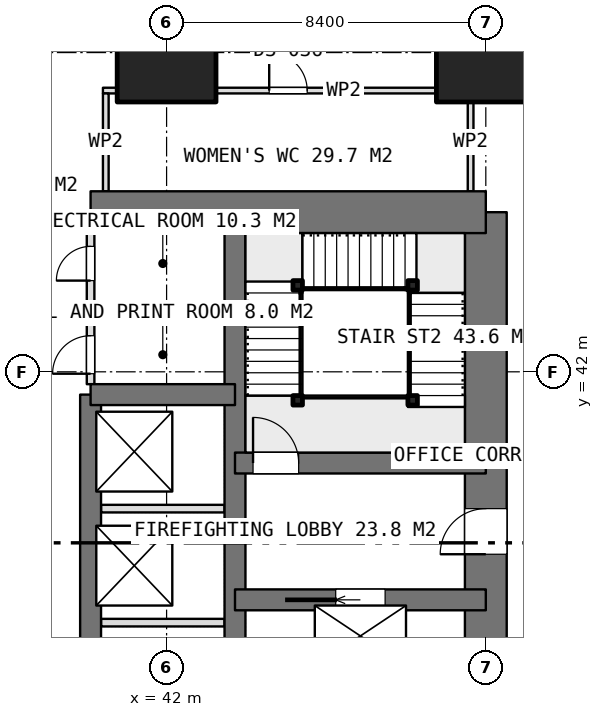
"""IFC4 building model, lengths in metres.
Left out: names, types, materials, properties, quantities, classifications, styles, units other than length and angle.
Written with IfcOpenShell. Run it as: python <this file> out.ifc"""

import sys

from ifc_helpers import new_model, si_unit, direction, frame, frame_2d, origin, origin_2d, place, context, subcontext, project, spatial, rectangle, extrude, element, fill, save


model = new_model("IFC4")
c1 = context("Model", 3, precision=1e-05, world=origin(), true_north=direction((0.0, 1.0)))
c2 = subcontext(c1, "Body", "Model", "MODEL_VIEW")
j1 = project(units=[si_unit("LENGTHUNIT", "METRE"), si_unit("PLANEANGLEUNIT", "RADIAN")], contexts=[c1])
p1 = place(None, origin())
s1 = spatial("IfcSite", under=j1, at=p1, CompositionType="ELEMENT")
p2 = place(p1, origin())
s2 = spatial("IfcBuilding", under=s1, at=p2, CompositionType="ELEMENT")
p3 = place(p2, frame((0.0, 0.0, 29.15)))
s3 = spatial("IfcBuildingStorey", under=s2, at=p3, CompositionType="ELEMENT", Elevation=29.15)
p4 = place(p3, frame((40.0, 46.2, 0.0), z_axis=(0.0, 0.0, 1.0), x_axis=(1.0, 0.0, 0.0)))
e1 = element("IfcWall", 1, at=p4, inside=s3, PredefinedType="SHEAR", context=c2, shape_type="SweptSolid", body=[
    extrude(rectangle(XDim=10.4, YDim=1.1, at=frame_2d((5.2, 0.0))), origin(), (0.0, 0.0, 1.0), 3.75),
])
p5 = place(p3, frame((50.4, 21.0, 0.0), z_axis=(0.0, 0.0, 1.0), x_axis=(0.0, 1.0, 0.0)))
e2 = element("IfcWall", 2, at=p5, inside=s3, PredefinedType="SHEAR", context=c2, shape_type="SweptSolid", body=[
    extrude(rectangle(XDim=25.2, YDim=1.1, at=frame_2d((12.6, 0.0))), origin(), (0.0, 0.0, 1.0), 3.75),
])
p6 = place(p5, frame((16.2, 0.0, 0.0)))
e3 = element("IfcOpeningElement", 3, at=p6, cuts=e2, PredefinedType="OPENING", context=c2, shape_type="SweptSolid", body=[
    extrude(rectangle(XDim=1.2, YDim=2.1, at=frame_2d((0.6, 1.05))), frame((0.0, 0.56, 0.0), z_axis=(0.0, -1.0, 0.0), x_axis=(1.0, 0.0, 0.0)), (0.0, 0.0, 1.0), 1.12),
])
p7 = place(p5, frame((10.05, 0.0, 0.0)))
e4 = element("IfcOpeningElement", 4, at=p7, cuts=e2, PredefinedType="OPENING", context=c2, shape_type="SweptSolid", body=[
    extrude(rectangle(XDim=0.9, YDim=2.1, at=frame_2d((0.45, 1.05))), frame((0.0, 0.56, 0.0), z_axis=(0.0, -1.0, 0.0), x_axis=(1.0, 0.0, 0.0)), (0.0, 0.0, 1.0), 1.12),
])
p8 = place(p5, frame((7.45, 0.0, 0.0)))
e5 = element("IfcOpeningElement", 5, at=p8, cuts=e2, PredefinedType="OPENING", context=c2, shape_type="SweptSolid", body=[
    extrude(rectangle(XDim=0.9, YDim=2.1, at=frame_2d((0.45, 1.05))), frame((0.0, 0.56, 0.0), z_axis=(0.0, -1.0, 0.0), x_axis=(1.0, 0.0, 0.0)), (0.0, 0.0, 1.0), 1.12),
])
p9 = place(p5, frame((0.75, 0.0, 0.0)))
e6 = element("IfcOpeningElement", 6, at=p9, cuts=e2, PredefinedType="OPENING", context=c2, shape_type="SweptSolid", body=[
    extrude(rectangle(XDim=1.2, YDim=2.1, at=frame_2d((0.6, 1.05))), frame((0.0, 0.56, 0.0), z_axis=(0.0, -1.0, 0.0), x_axis=(1.0, 0.0, 0.0)), (0.0, 0.0, 1.0), 1.12),
])
p10 = place(p3, frame((43.8, 21.0, 0.0), z_axis=(0.0, 0.0, 1.0), x_axis=(0.0, 1.0, 0.0)))
e7 = element("IfcWall", 7, at=p10, inside=s3, PredefinedType="SHEAR", context=c2, shape_type="SweptSolid", body=[
    extrude(rectangle(XDim=25.2, YDim=0.55, at=frame_2d((12.6, 0.0))), origin(), (0.0, 0.0, 1.0), 3.75),
])
p11 = place(p3, frame((40.0, 23.4, 0.0), z_axis=(0.0, 0.0, 1.0), x_axis=(0.0, 1.0, 0.0)))
e8 = element("IfcWall", 8, at=p11, inside=s3, PredefinedType="SHEAR", context=c2, shape_type="SweptSolid", body=[
    extrude(rectangle(XDim=18.0, YDim=0.55, at=frame_2d((9.0, 0.0))), origin(), (0.0, 0.0, 1.0), 3.75),
])
p12 = place(p3, frame((40.0, 41.4, 0.0), z_axis=(0.0, 0.0, 1.0), x_axis=(1.0, 0.0, 0.0)))
e9 = element("IfcWall", 9, at=p12, inside=s3, PredefinedType="SHEAR", context=c2, shape_type="SweptSolid", body=[
    extrude(rectangle(XDim=3.8, YDim=0.55, at=frame_2d((1.9, 0.0))), origin(), (0.0, 0.0, 1.0), 3.75),
])
p13 = place(p3, frame((43.8, 36.0, 0.0), z_axis=(0.0, 0.0, 1.0), x_axis=(1.0, 0.0, 0.0)))
e10 = element("IfcWall", 10, at=p13, inside=s3, PredefinedType="SHEAR", context=c2, shape_type="SweptSolid", body=[
    extrude(rectangle(XDim=6.6, YDim=0.55, at=frame_2d((3.3, 0.0))), origin(), (0.0, 0.0, 1.0), 3.75),
])
p14 = place(p13, frame((2.65, 0.0, 0.0)))
e11 = element("IfcOpeningElement", 11, at=p14, cuts=e10, PredefinedType="OPENING", context=c2, shape_type="SweptSolid", body=[
    extrude(rectangle(XDim=1.3, YDim=2.1, at=frame_2d((0.65, 1.05))), frame((0.0, 0.285, 0.0), z_axis=(0.0, -1.0, 0.0), x_axis=(1.0, 0.0, 0.0)), (0.0, 0.0, 1.0), 0.57),
])
p15 = place(p3, frame((43.8, 39.6, 0.0), z_axis=(0.0, 0.0, 1.0), x_axis=(1.0, 0.0, 0.0)))
e12 = element("IfcWall", 12, at=p15, inside=s3, PredefinedType="SHEAR", context=c2, shape_type="SweptSolid", body=[
    extrude(rectangle(XDim=6.6, YDim=0.55, at=frame_2d((3.3, 0.0))), origin(), (0.0, 0.0, 1.0), 3.75),
])
p16 = place(p15, frame((0.475, 0.0, 0.0)))
e13 = element("IfcOpeningElement", 13, at=p16, cuts=e12, PredefinedType="OPENING", context=c2, shape_type="SweptSolid", body=[
    extrude(rectangle(XDim=1.2, YDim=2.1, at=frame_2d((0.6, 1.05))), frame((0.0, 0.285, 0.0), z_axis=(0.0, -1.0, 0.0), x_axis=(1.0, 0.0, 0.0)), (0.0, 0.0, 1.0), 0.57),
])
for number, where, z_axis, x_axis in (
    (14, (42.0, 50.4, 0.0), (0.0, 0.0, 1.0), (1.0, 0.0, 0.0)),
    (15, (50.4, 50.4, 0.0), (0.0, 0.0, 1.0), (1.0, 0.0, 0.0)),
):
    element("IfcColumn", number, at=place(p3, frame(where, z_axis=z_axis, x_axis=x_axis)), inside=s3, PredefinedType="COLUMN", context=c2, shape_type="SweptSolid", body=[
        extrude(rectangle(XDim=2.6, YDim=2.6, at=origin_2d()), origin(), (0.0, 0.0, 1.0), 3.75),
    ])
for number, where, z_axis, x_axis in (
    (16, (40.275, 35.4, 0.0), (0.0, 0.0, 1.0), (1.0, 0.0, 0.0)),
    (17, (40.275, 38.4, 0.0), (0.0, 0.0, 1.0), (1.0, 0.0, 0.0)),
):
    element("IfcWall", number, at=place(p3, frame(where, z_axis=z_axis, x_axis=x_axis)), inside=s3, PredefinedType="PARTITIONING", context=c2, shape_type="SweptSolid", body=[
        extrude(rectangle(XDim=3.25, YDim=0.2, at=frame_2d((1.625, 0.0))), origin(), (0.0, 0.0, 1.0), 3.5),
    ])
p17 = place(p3, frame((40.0, 41.675, 0.0), z_axis=(0.0, 0.0, 1.0), x_axis=(0.0, 1.0, 0.0)))
e18 = element("IfcWall", 18, at=p17, inside=s3, PredefinedType="PARTITIONING", context=c2, shape_type="SweptSolid", body=[
    extrude(rectangle(XDim=3.975, YDim=0.2, at=frame_2d((1.987, 0.0))), origin(), (0.0, 0.0, 1.0), 3.5),
])
p18 = place(p17, frame((2.725, 0.0, 0.0)))
e19 = element("IfcOpeningElement", 19, at=p18, cuts=e18, PredefinedType="OPENING", context=c2, shape_type="SweptSolid", body=[
    extrude(rectangle(XDim=0.9, YDim=2.1, at=frame_2d((0.45, 1.05))), frame((0.0, 0.11, 0.0), z_axis=(0.0, -1.0, 0.0), x_axis=(1.0, 0.0, 0.0)), (0.0, 0.0, 1.0), 0.22),
])
p19 = place(p17, frame((0.275, 0.0, 0.0)))
e20 = element("IfcOpeningElement", 20, at=p19, cuts=e18, PredefinedType="OPENING", context=c2, shape_type="SweptSolid", body=[
    extrude(rectangle(XDim=1.0, YDim=2.1, at=frame_2d((0.5, 1.05))), frame((0.0, 0.11, 0.0), z_axis=(0.0, -1.0, 0.0), x_axis=(1.0, 0.0, 0.0)), (0.0, 0.0, 1.0), 0.22),
])
p20 = place(p3, frame((40.0, 43.5, 0.0), z_axis=(0.0, 0.0, 1.0), x_axis=(1.0, 0.0, 0.0)))
e21 = element("IfcWall", 21, at=p20, inside=s3, PredefinedType="PARTITIONING", context=c2, shape_type="SweptSolid", body=[
    extrude(rectangle(XDim=3.525, YDim=0.2, at=frame_2d((1.762, 0.0))), origin(), (0.0, 0.0, 1.0), 3.5),
])
p21 = place(p3, frame((40.325, 49.4, 0.0), z_axis=(0.0, 0.0, 1.0), x_axis=(1.0, 0.0, 0.0)))
e22 = element("IfcWall", 22, at=p21, inside=s3, PredefinedType="PARTITIONING", context=c2, shape_type="SweptSolid", body=[
    extrude(rectangle(XDim=9.75, YDim=0.15, at=frame_2d((4.875, 0.0))), origin(), (0.0, 0.0, 1.0), 3.5),
])
p22 = place(p21, frame((4.375, 0.0, 0.0)))
e23 = element("IfcOpeningElement", 23, at=p22, cuts=e22, PredefinedType="OPENING", context=c2, shape_type="SweptSolid", body=[
    extrude(rectangle(XDim=1.0, YDim=2.1, at=frame_2d((0.5, 1.05))), frame((0.0, 0.085, 0.0), z_axis=(0.0, -1.0, 0.0), x_axis=(1.0, 0.0, 0.0)), (0.0, 0.0, 1.0), 0.17),
])
for number, where, z_axis, x_axis in (
    (24, (40.4, 46.75, 0.0), (0.0, 0.0, 1.0), (0.0, 1.0, 0.0)),
    (25, (50.0, 46.75, 0.0), (0.0, 0.0, 1.0), (0.0, 1.0, 0.0)),
):
    element("IfcWall", number, at=place(p3, frame(where, z_axis=z_axis, x_axis=x_axis)), inside=s3, PredefinedType="PARTITIONING", context=c2, shape_type="SweptSolid", body=[
        extrude(rectangle(XDim=2.575, YDim=0.15, at=frame_2d((1.288, 0.0))), origin(), (0.0, 0.0, 1.0), 3.5),
    ])
for number, where, z_axis, x_axis in (
    (26, (45.45, 41.25, 0.0), (0.0, 0.0, 1.0), (1.0, 0.0, 0.0)),
    (27, (45.45, 44.275, 0.0), (0.0, 0.0, 1.0), (1.0, 0.0, 0.0)),
    (28, (48.475, 44.275, 0.0), (0.0, 0.0, 1.0), (1.0, 0.0, 0.0)),
    (29, (48.475, 41.25, 0.0), (0.0, 0.0, 1.0), (1.0, 0.0, 0.0)),
):
    element("IfcColumn", number, at=place(p3, frame(where, z_axis=z_axis, x_axis=x_axis)), inside=s3, PredefinedType="COLUMN", context=c2, shape_type="SweptSolid", body=[
        extrude(rectangle(XDim=0.25, YDim=0.25, at=origin_2d()), origin(), (0.0, 0.0, 1.0), 3.75),
    ])
p23 = place(p6, origin())
e30 = element("IfcDoor", 30, at=p23, inside=s3, OperationType="SINGLE_SWING_LEFT", PredefinedType="DOOR", context=c2, shape_type="SweptSolid", body=[
    extrude(rectangle(XDim=1.2, YDim=2.1, at=frame_2d((0.6, 1.05))), frame((0.0, 0.025, 0.0), z_axis=(0.0, -1.0, 0.0), x_axis=(1.0, 0.0, 0.0)), (0.0, 0.0, 1.0), 0.05),
])
fill(e3, e30)
p24 = place(p18, origin())
e31 = element("IfcDoor", 31, at=p24, inside=s3, OperationType="SINGLE_SWING_LEFT", PredefinedType="DOOR", context=c2, shape_type="SweptSolid", body=[
    extrude(rectangle(XDim=0.9, YDim=2.1, at=frame_2d((0.45, 1.05))), frame((0.0, 0.025, 0.0), z_axis=(0.0, -1.0, 0.0), x_axis=(1.0, 0.0, 0.0)), (0.0, 0.0, 1.0), 0.05),
])
fill(e19, e31)
p25 = place(p19, origin())
e32 = element("IfcDoor", 32, at=p25, inside=s3, OperationType="SINGLE_SWING_LEFT", PredefinedType="DOOR", context=c2, shape_type="SweptSolid", body=[
    extrude(rectangle(XDim=1.0, YDim=2.1, at=frame_2d((0.5, 1.05))), frame((0.0, 0.025, 0.0), z_axis=(0.0, -1.0, 0.0), x_axis=(1.0, 0.0, 0.0)), (0.0, 0.0, 1.0), 0.05),
])
fill(e20, e32)
p26 = place(p14, origin())
e33 = element("IfcDoor", 33, at=p26, inside=s3, OperationType="SLIDING_TO_LEFT", PredefinedType="USERDEFINED", context=c2, shape_type="SweptSolid", body=[
    extrude(rectangle(XDim=1.3, YDim=2.1, at=frame_2d((0.65, 1.05))), frame((0.0, 0.025, 0.0), z_axis=(0.0, -1.0, 0.0), x_axis=(1.0, 0.0, 0.0)), (0.0, 0.0, 1.0), 0.05),
])
fill(e11, e33)
p27 = place(p22, origin())
e34 = element("IfcDoor", 34, at=p27, inside=s3, OperationType="SINGLE_SWING_LEFT", PredefinedType="DOOR", context=c2, shape_type="SweptSolid", body=[
    extrude(rectangle(XDim=1.0, YDim=2.1, at=frame_2d((0.5, 1.05))), frame((0.0, 0.025, 0.0), z_axis=(0.0, -1.0, 0.0), x_axis=(1.0, 0.0, 0.0)), (0.0, 0.0, 1.0), 0.05),
])
fill(e23, e34)
p28 = place(p16, origin())
e35 = element("IfcDoor", 35, at=p28, inside=s3, OperationType="SINGLE_SWING_RIGHT", PredefinedType="DOOR", context=c2, shape_type="SweptSolid", body=[
    extrude(rectangle(XDim=1.2, YDim=2.1, at=frame_2d((0.6, 1.05))), frame((0.0, 0.025, 0.0), z_axis=(0.0, -1.0, 0.0), x_axis=(1.0, 0.0, 0.0)), (0.0, 0.0, 1.0), 0.05),
])
fill(e13, e35)
save(model, sys.argv[1])
